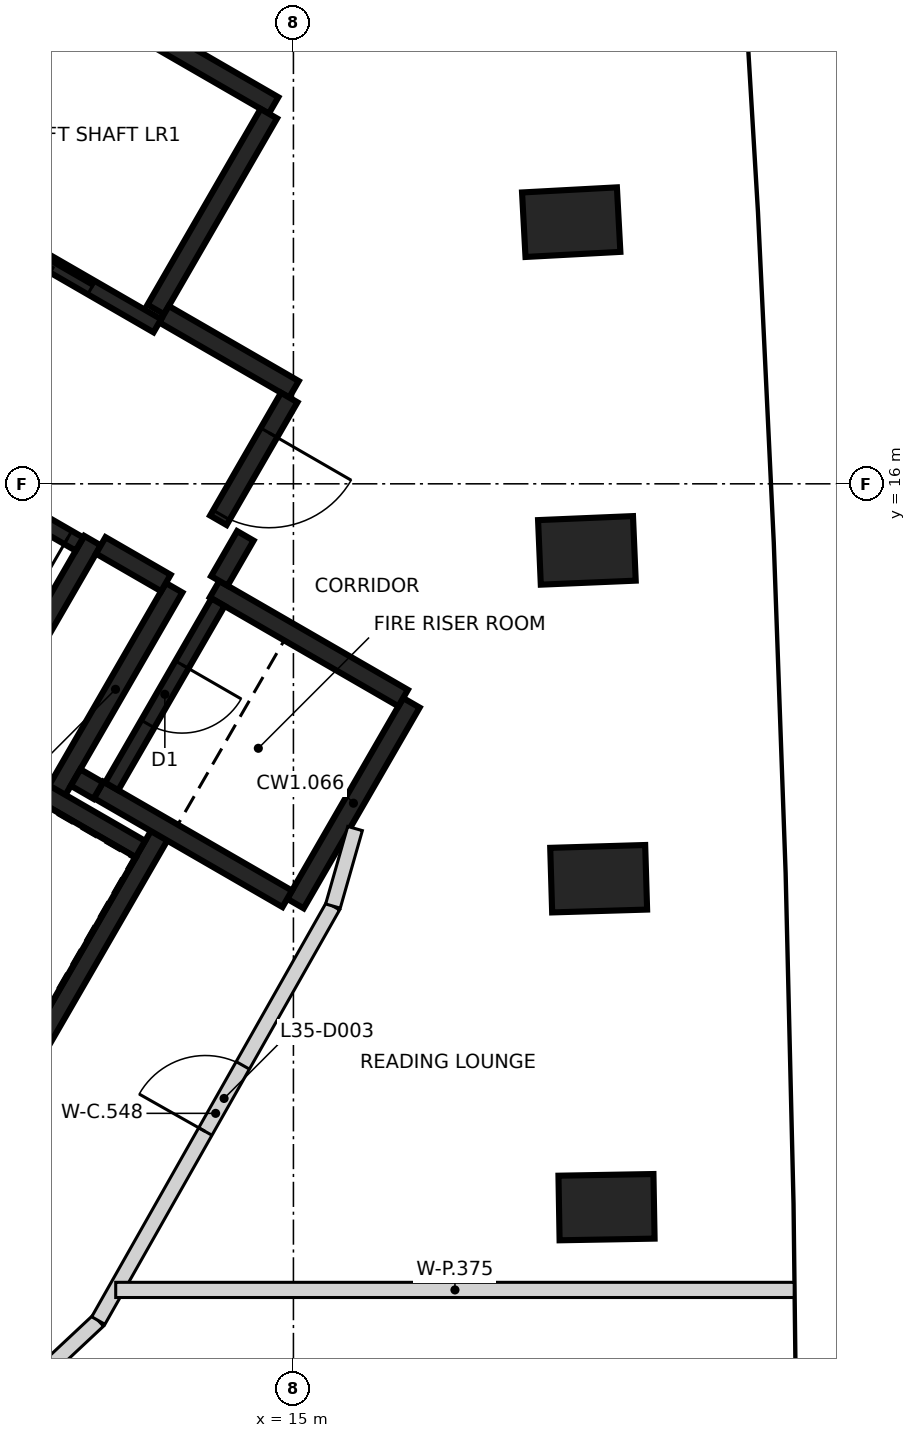
"""IFC4 building model, lengths in metres.
Left out: names, types, materials, properties, quantities, classifications, styles, units other than length and angle.
Written with IfcOpenShell. Run it as: python <this file> out.ifc"""

import sys

from ifc_helpers import new_model, si_unit, direction, frame, frame_2d, origin, origin_2d, place, context, subcontext, project, spatial, rectangle, extrude, element, fill, save


model = new_model("IFC4")
c1 = context("Model", 3, precision=1e-05, world=origin(), true_north=direction((0.0, 1.0)))
c2 = subcontext(c1, "Body", "Model", "MODEL_VIEW")
j1 = project(units=[si_unit("LENGTHUNIT", "METRE"), si_unit("PLANEANGLEUNIT", "RADIAN")], contexts=[c1])
p1 = place(None, origin())
s1 = spatial("IfcSite", under=j1, at=p1, CompositionType="ELEMENT")
p2 = place(p1, origin())
s2 = spatial("IfcBuilding", under=s1, at=p2, CompositionType="ELEMENT")
p3 = place(p2, frame((0.0, 0.0, 143.2)))
s3 = spatial("IfcBuildingStorey", under=s2, at=p3, CompositionType="ELEMENT", Elevation=143.2)
for number, where, z_axis, x_axis in (
    (1, (19.119, 6.484, -0.4), (0.0, 0.0, 1.0), (1.0, 0.018, 0.0)),
    (2, (19.016, 10.805, -0.4), (0.0, 0.0, 1.0), (1.0, 0.03, 0.0)),
    (3, (18.861, 15.124, -0.4), (0.0, 0.0, 1.0), (0.999, 0.042, 0.0)),
    (4, (18.655, 19.442, -0.4), (0.0, 0.0, 1.0), (0.999, 0.054, 0.0)),
):
    element("IfcColumn", number, at=place(p3, frame(where, z_axis=z_axis, x_axis=x_axis)), inside=s3, PredefinedType="COLUMN", context=c2, shape_type="SweptSolid", body=[
        extrude(rectangle(XDim=1.25, YDim=0.85, at=origin_2d()), origin(), (0.0, 0.0, 1.0), 3.6),
    ])
p4 = place(p3, frame((9.673, 23.903, 0.0), z_axis=(0.0, 0.0, 1.0), x_axis=(0.86603616409, -0.499981362141, 0.0)))
e5 = element("IfcWall", 5, at=p4, inside=s3, PredefinedType="SHEAR", context=c2, shape_type="SweptSolid", body=[
    extrude(rectangle(XDim=5.85, YDim=0.25, at=frame_2d((2.925, 0.0))), origin(), (0.0, 0.0, 1.0), 3.2),
])
p5 = place(p3, frame((13.238, 11.378, 0.0), z_axis=(0.0, 0.0, 1.0), x_axis=(-0.500008851346, -0.866020293397, 0.0)))
e6 = element("IfcWall", 6, at=p5, inside=s3, PredefinedType="SHEAR", context=c2, shape_type="SweptSolid", body=[
    extrude(rectangle(XDim=5.51, YDim=0.25, at=frame_2d((2.755, 0.0))), origin(), (0.0, 0.0, 1.0), 3.2),
])
p6 = place(p3, frame((12.357, 15.252, 0.0), z_axis=(0.0, 0.0, 1.0), x_axis=(-0.500028443584, -0.866008981251, 0.0)))
e7 = element("IfcWall", 7, at=p6, inside=s3, PredefinedType="SHEAR", context=c2, shape_type="SweptSolid", body=[
    extrude(rectangle(XDim=3.2, YDim=0.25, at=frame_2d((1.6, 0.0))), origin(), (0.0, 0.0, 1.0), 3.2),
])
p7 = place(p3, frame((14.676, 20.87, 0.0), z_axis=(0.0, 0.0, 1.0), x_axis=(-0.499987686533, -0.866032512851, 0.0)))
e8 = element("IfcWall", 8, at=p7, inside=s3, PredefinedType="SHEAR", context=c2, shape_type="SweptSolid", body=[
    extrude(rectangle(XDim=2.975, YDim=0.25, at=frame_2d((1.487, 0.0))), origin(), (0.0, 0.0, 1.0), 3.2),
])
p8 = place(p3, frame((16.552, 13.119, 0.0), z_axis=(0.0, 0.0, 1.0), x_axis=(-0.499978833458, -0.866037623948, 0.0)))
e9 = element("IfcWall", 9, at=p8, inside=s3, PredefinedType="SHEAR", context=c2, shape_type="SweptSolid", body=[
    extrude(rectangle(XDim=3.05, YDim=0.25, at=frame_2d((1.525, 0.0))), origin(), (0.0, 0.0, 1.0), 3.2),
])
p9 = place(p3, frame((14.918, 10.54, 0.0), z_axis=(0.0, 0.0, 1.0), x_axis=(-0.866063538972, 0.499933942099, 0.0)))
e10 = element("IfcWall", 10, at=p9, inside=s3, PredefinedType="SHEAR", context=c2, shape_type="SweptSolid", body=[
    extrude(rectangle(XDim=2.865, YDim=0.25, at=frame_2d((1.432, 0.0))), origin(), (0.0, 0.0, 1.0), 3.2),
])
p10 = place(p3, frame((13.963, 14.614, 0.0), z_axis=(0.0, 0.0, 1.0), x_axis=(0.866042235819, -0.499970844928, 0.0)))
e11 = element("IfcWall", 11, at=p10, inside=s3, PredefinedType="SHEAR", context=c2, shape_type="SweptSolid", body=[
    extrude(rectangle(XDim=2.865, YDim=0.25, at=frame_2d((1.432, 0.0))), origin(), (0.0, 0.0, 1.0), 3.2),
])
p11 = place(p3, frame((11.888, 11.961, 0.0), z_axis=(0.0, 0.0, 1.0), x_axis=(0.500003324108, 0.866023484601, 0.0)))
e12 = element("IfcWall", 12, at=p11, inside=s3, PredefinedType="SHEAR", context=c2, shape_type="SweptSolid", body=[
    extrude(rectangle(XDim=3.085, YDim=0.25, at=frame_2d((1.542, 0.0))), origin(), (0.0, 0.0, 1.0), 3.2),
])
p12 = place(p3, frame((10.865, 12.418, 0.0), z_axis=(0.0, 0.0, 1.0), x_axis=(0.866026229868, -0.499998569178, 0.0)))
e13 = element("IfcWall", 13, at=p12, inside=s3, PredefinedType="SHEAR", context=c2, shape_type="SweptSolid", body=[
    extrude(rectangle(XDim=2.449, YDim=0.25, at=frame_2d((1.225, 0.0))), origin(), (0.0, 0.0, 1.0), 3.2),
])
p13 = place(p3, frame((13.297, 18.231, 0.0), z_axis=(0.0, 0.0, 1.0), x_axis=(0.866043531843, -0.499968599967, 0.0)))
e14 = element("IfcWall", 14, at=p13, inside=s3, PredefinedType="SHEAR", context=c2, shape_type="SweptSolid", body=[
    extrude(rectangle(XDim=1.975, YDim=0.25, at=frame_2d((0.987, 0.0))), origin(), (0.0, 0.0, 1.0), 3.2),
])
p14 = place(p3, frame((14.945, 17.135, 0.0), z_axis=(0.0, 0.0, 1.0), x_axis=(-0.499983108224, -0.866035156036, 0.0)))
e15 = element("IfcWall", 15, at=p14, inside=s3, PredefinedType="SHEAR", context=c2, shape_type="SweptSolid", body=[
    extrude(rectangle(XDim=1.865, YDim=0.25, at=frame_2d((0.932, 0.0))), origin(), (0.0, 0.0, 1.0), 3.2),
])
p15 = place(p14, frame((0.535, 0.0, 0.0)))
e16 = element("IfcOpeningElement", 16, at=p15, cuts=e15, PredefinedType="OPENING", context=c2, shape_type="SweptSolid", body=[
    extrude(rectangle(XDim=1.25, YDim=2.1, at=frame_2d((0.625, 1.05))), frame((0.0, 0.135, 0.0), z_axis=(0.0, -1.0, 0.0), x_axis=(1.0, 0.0, 0.0)), (0.0, 0.0, 1.0), 0.27),
])
p16 = place(p3, frame((13.322, 14.695, 0.0), z_axis=(0.0, 0.0, 1.0), x_axis=(-0.866017078145, 0.500014420154, 0.0)))
e17 = element("IfcWall", 17, at=p16, inside=s3, PredefinedType="SHEAR", context=c2, shape_type="SweptSolid", body=[
    extrude(rectangle(XDim=0.989, YDim=0.25, at=frame_2d((0.495, 0.0))), origin(), (0.0, 0.0, 1.0), 3.2),
])
p17 = place(p3, frame((14.368, 15.315, 0.0), z_axis=(0.0, 0.0, 1.0), x_axis=(-0.499897359611, -0.866084655132, 0.0)))
e18 = element("IfcWall", 18, at=p17, inside=s3, PredefinedType="SHEAR", context=c2, shape_type="SweptSolid", body=[
    extrude(rectangle(XDim=0.685, YDim=0.25, at=frame_2d((0.342, 0.0))), origin(), (0.0, 0.0, 1.0), 3.2),
])
p18 = place(p3, frame((12.433, 11.964, 0.0), z_axis=(0.0, 0.0, 1.0), x_axis=(-0.866055875208, 0.499947218231, 0.0)))
e19 = element("IfcWall", 19, at=p18, inside=s3, PredefinedType="SHEAR", context=c2, shape_type="SweptSolid", body=[
    extrude(rectangle(XDim=0.345, YDim=0.25, at=frame_2d((0.172, 0.0))), origin(), (0.0, 0.0, 1.0), 3.2),
])
p19 = place(p3, frame((13.21, 18.08, 0.0), z_axis=(0.0, 0.0, 1.0), x_axis=(-0.866030299012, 0.499991521122, 0.0)))
e20 = element("IfcWall", 20, at=p19, inside=s3, PredefinedType="SHEAR", context=c2, shape_type="SweptSolid", body=[
    extrude(rectangle(XDim=6.1, YDim=0.2, at=frame_2d((3.05, 0.0))), origin(), (0.0, 0.0, 1.0), 3.2),
])
p20 = place(p19, frame((1.0, 0.0, 0.0)))
e21 = element("IfcOpeningElement", 21, at=p20, cuts=e20, PredefinedType="OPENING", context=c2, shape_type="SweptSolid", body=[
    extrude(rectangle(XDim=1.2, YDim=2.1, at=frame_2d((0.6, 1.05))), frame((0.0, 0.11, 0.0), z_axis=(0.0, -1.0, 0.0), x_axis=(1.0, 0.0, 0.0)), (0.0, 0.0, 1.0), 0.22),
])
p21 = place(p19, frame((4.05, 0.0, 0.0)))
e22 = element("IfcOpeningElement", 22, at=p21, cuts=e20, PredefinedType="OPENING", context=c2, shape_type="SweptSolid", body=[
    extrude(rectangle(XDim=1.2, YDim=2.1, at=frame_2d((0.6, 1.05))), frame((0.0, 0.11, 0.0), z_axis=(0.0, -1.0, 0.0), x_axis=(1.0, 0.0, 0.0)), (0.0, 0.0, 1.0), 0.22),
])
p22 = place(p3, frame((12.185, 15.207, 0.0), z_axis=(0.0, 0.0, 1.0), x_axis=(-0.866020080793, 0.500009219579, 0.0)))
e23 = element("IfcWall", 23, at=p22, inside=s3, PredefinedType="SHEAR", context=c2, shape_type="SweptSolid", body=[
    extrude(rectangle(XDim=5.699, YDim=0.2, at=frame_2d((2.85, 0.0))), origin(), (0.0, 0.0, 1.0), 3.2),
])
p23 = place(p22, frame((0.174, 0.0, 0.0)))
e24 = element("IfcOpeningElement", 24, at=p23, cuts=e23, PredefinedType="OPENING", context=c2, shape_type="SweptSolid", body=[
    extrude(rectangle(XDim=0.9, YDim=2.1, at=frame_2d((0.45, 1.05))), frame((0.0, 0.11, 0.0), z_axis=(0.0, -1.0, 0.0), x_axis=(1.0, 0.0, 0.0)), (0.0, 0.0, 1.0), 0.22),
])
p24 = place(p22, frame((4.599, 0.0, 0.0)))
e25 = element("IfcOpeningElement", 25, at=p24, cuts=e23, PredefinedType="OPENING", context=c2, shape_type="SweptSolid", body=[
    extrude(rectangle(XDim=0.9, YDim=2.1, at=frame_2d((0.45, 1.05))), frame((0.0, 0.11, 0.0), z_axis=(0.0, -1.0, 0.0), x_axis=(1.0, 0.0, 0.0)), (0.0, 0.0, 1.0), 0.22),
])
p25 = place(p3, frame((10.489, 19.767, 0.0), z_axis=(0.0, 0.0, 1.0), x_axis=(0.499946628782, 0.866056215479, 0.0)))
e26 = element("IfcWall", 26, at=p25, inside=s3, PredefinedType="SHEAR", context=c2, shape_type="SweptSolid", body=[
    extrude(rectangle(XDim=3.048, YDim=0.2, at=frame_2d((1.524, 0.0))), origin(), (0.0, 0.0, 1.0), 3.2),
])
p26 = place(p3, frame((14.008, 14.442, 0.0), z_axis=(0.0, 0.0, 1.0), x_axis=(-0.499986818241, -0.866033014143, 0.0)))
e27 = element("IfcWall", 27, at=p26, inside=s3, PredefinedType="SHEAR", context=c2, shape_type="SweptSolid", body=[
    extrude(rectangle(XDim=2.798, YDim=0.2, at=frame_2d((1.399, 0.0))), origin(), (0.0, 0.0, 1.0), 3.2),
])
p27 = place(p26, frame((0.949, 0.0, 0.0)))
e28 = element("IfcOpeningElement", 28, at=p27, cuts=e27, PredefinedType="OPENING", context=c2, shape_type="SweptSolid", body=[
    extrude(rectangle(XDim=0.9, YDim=2.1, at=frame_2d((0.45, 1.05))), frame((0.0, 0.11, 0.0), z_axis=(0.0, -1.0, 0.0), x_axis=(1.0, 0.0, 0.0)), (0.0, 0.0, 1.0), 0.22),
])
p28 = place(p3, frame((11.458, 4.078, 0.0), z_axis=(0.0, 0.0, 1.0), x_axis=(0.729936032318, 0.683515463412, 0.0)))
e29 = element("IfcWall", 29, at=p28, inside=s3, PredefinedType="PARTITIONING", context=c2, shape_type="SweptSolid", body=[
    extrude(rectangle(XDim=1.336, YDim=0.2, at=frame_2d((0.668, 0.0))), origin(), (0.0, 0.0, 1.0), 3.2),
])
p29 = place(p3, frame((12.433, 4.992, 0.0), z_axis=(0.0, 0.0, 1.0), x_axis=(0.492740203499, 0.870176471675, 0.0)))
e30 = element("IfcWall", 30, at=p29, inside=s3, PredefinedType="PARTITIONING", context=c2, shape_type="SweptSolid", body=[
    extrude(rectangle(XDim=6.265, YDim=0.2, at=frame_2d((3.133, 0.0))), origin(), (0.0, 0.0, 1.0), 3.2),
])
p30 = place(p29, frame((2.858, 0.0, 0.0)))
e31 = element("IfcOpeningElement", 31, at=p30, cuts=e30, PredefinedType="OPENING", context=c2, shape_type="SweptSolid", body=[
    extrude(rectangle(XDim=1.0, YDim=2.1, at=frame_2d((0.5, 1.05))), frame((0.0, 0.11, 0.0), z_axis=(0.0, -1.0, 0.0), x_axis=(1.0, 0.0, 0.0)), (0.0, 0.0, 1.0), 0.22),
])
p31 = place(p3, frame((15.52, 10.445, 0.0), z_axis=(0.0, 0.0, 1.0), x_axis=(0.274143458758, 0.961688808306, 0.0)))
e32 = element("IfcWall", 32, at=p31, inside=s3, PredefinedType="PARTITIONING", context=c2, shape_type="SweptSolid", body=[
    extrude(rectangle(XDim=1.061, YDim=0.2, at=frame_2d((0.53, 0.0))), origin(), (0.0, 0.0, 1.0), 3.2),
])
p32 = place(p3, frame((12.662, 5.395, 0.0), z_axis=(0.0, 0.0, 1.0), x_axis=(1.0, 0.0, 0.0)))
e33 = element("IfcWall", 33, at=p32, inside=s3, PredefinedType="PARTITIONING", context=c2, shape_type="SweptSolid", body=[
    extrude(rectangle(XDim=8.926, YDim=0.2, at=frame_2d((4.463, 0.0))), origin(), (0.0, 0.0, 1.0), 2.3),
])
p33 = place(p20, origin())
e34 = element("IfcDoor", 34, at=p33, inside=s3, OperationType="DOUBLE_DOOR_SLIDING", PredefinedType="DOOR", context=c2, shape_type="SweptSolid", body=[
    extrude(rectangle(XDim=1.2, YDim=2.1, at=frame_2d((0.6, 1.05))), frame((0.0, 0.025, 0.0), z_axis=(0.0, -1.0, 0.0), x_axis=(1.0, 0.0, 0.0)), (0.0, 0.0, 1.0), 0.05),
])
fill(e21, e34)
p34 = place(p15, origin())
e35 = element("IfcDoor", 35, at=p34, inside=s3, OperationType="SINGLE_SWING_LEFT", PredefinedType="DOOR", context=c2, shape_type="SweptSolid", body=[
    extrude(rectangle(XDim=1.25, YDim=2.1, at=frame_2d((0.625, 1.05))), frame((0.0, 0.025, 0.0), z_axis=(0.0, -1.0, 0.0), x_axis=(1.0, 0.0, 0.0)), (0.0, 0.0, 1.0), 0.05),
])
fill(e16, e35)
p35 = place(p23, origin())
e36 = element("IfcDoor", 36, at=p35, inside=s3, OperationType="SINGLE_SWING_RIGHT", PredefinedType="DOOR", context=c2, shape_type="SweptSolid", body=[
    extrude(rectangle(XDim=0.9, YDim=2.1, at=frame_2d((0.45, 1.05))), frame((0.0, 0.025, 0.0), z_axis=(0.0, -1.0, 0.0), x_axis=(1.0, 0.0, 0.0)), (0.0, 0.0, 1.0), 0.05),
])
fill(e24, e36)
p36 = place(p27, origin())
e37 = element("IfcDoor", 37, at=p36, inside=s3, OperationType="SINGLE_SWING_RIGHT", PredefinedType="DOOR", context=c2, shape_type="SweptSolid", body=[
    extrude(rectangle(XDim=0.9, YDim=2.1, at=frame_2d((0.45, 1.05))), frame((0.0, 0.025, 0.0), z_axis=(0.0, -1.0, 0.0), x_axis=(1.0, 0.0, 0.0)), (0.0, 0.0, 1.0), 0.05),
])
fill(e28, e37)
p37 = place(p30, frame((1.0, 0.0, 0.0), z_axis=(0.0, 0.0, 1.0), x_axis=(-1.0, 0.0, 0.0)))
e38 = element("IfcDoor", 38, at=p37, inside=s3, OperationType="SINGLE_SWING_LEFT", PredefinedType="DOOR", context=c2, shape_type="SweptSolid", body=[
    extrude(rectangle(XDim=1.0, YDim=2.1, at=frame_2d((0.5, 1.05))), frame((0.0, 0.025, 0.0), z_axis=(0.0, -1.0, 0.0), x_axis=(1.0, 0.0, 0.0)), (0.0, 0.0, 1.0), 0.05),
])
fill(e31, e38)
save(model, sys.argv[1])
